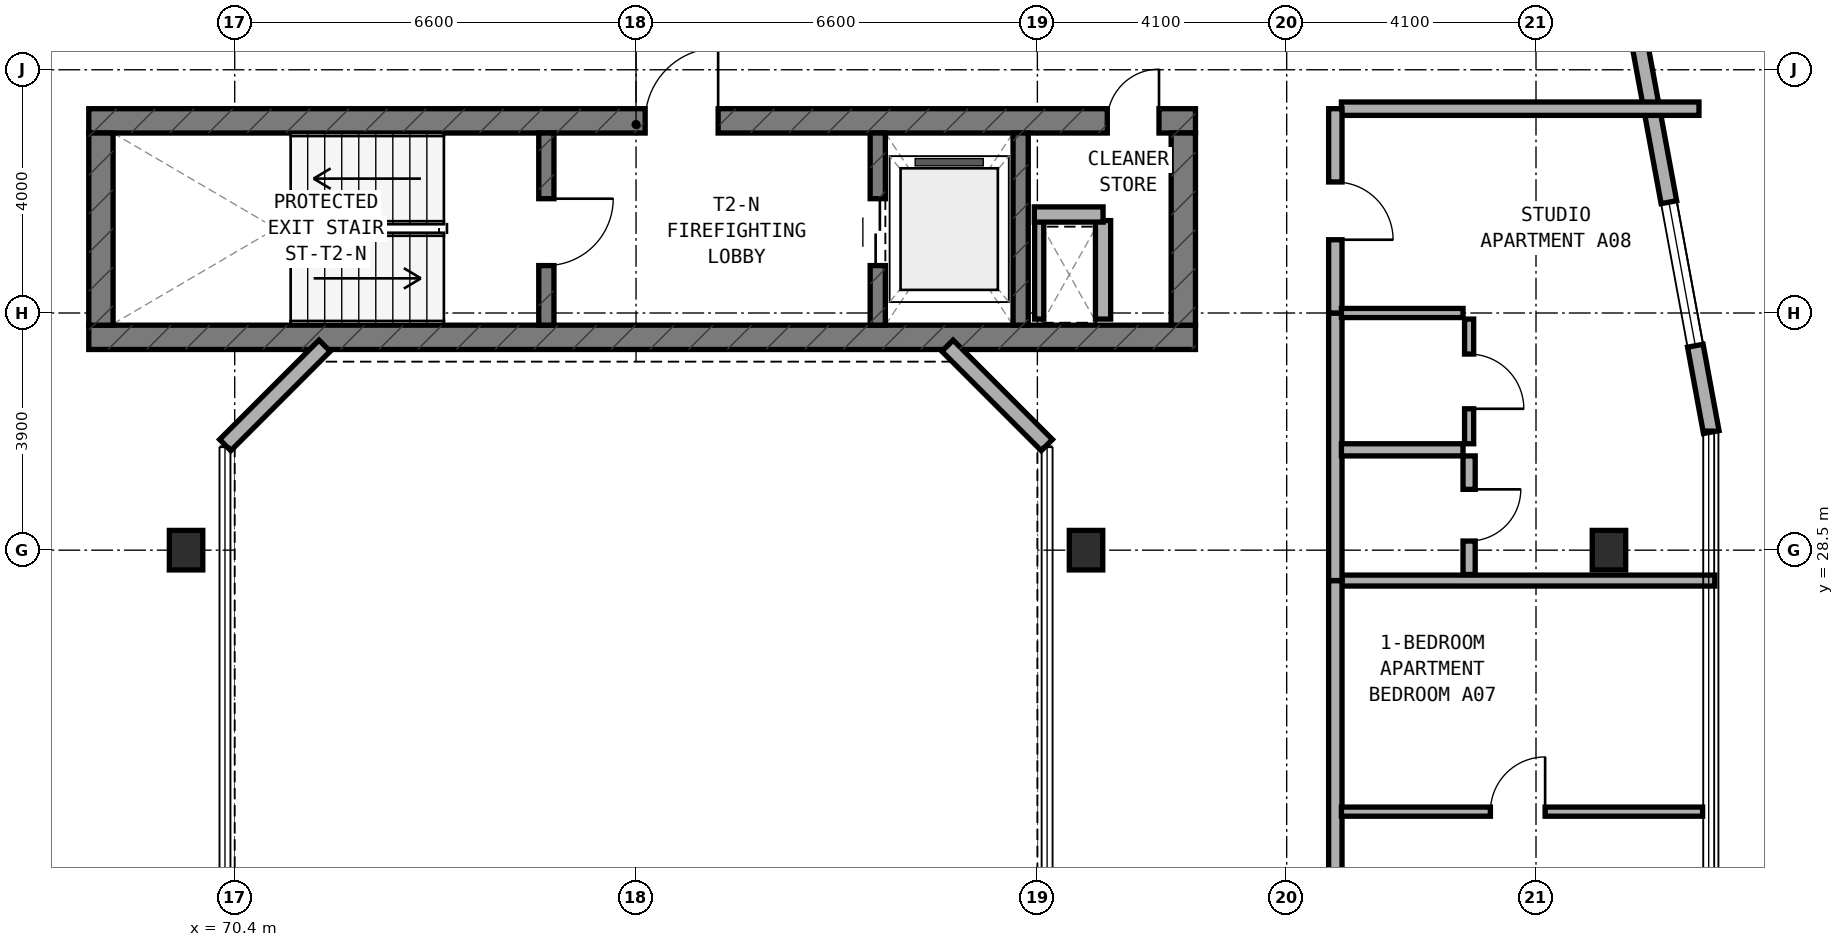
"""IFC4 building model, lengths in metres.
Left out: names, types, materials, properties, quantities, classifications, styles, units other than length and angle.
Written with IfcOpenShell. Run it as: python <this file> out.ifc"""

import sys

from ifc_helpers import new_model, si_unit, direction, frame, frame_2d, origin, origin_2d, place, context, subcontext, project, spatial, rectangle, extrude, element, fill, save


model = new_model("IFC4")
c1 = context("Model", 3, precision=1e-05, world=origin(), true_north=direction((0.0, 1.0)))
c2 = subcontext(c1, "Body", "Model", "MODEL_VIEW")
j1 = project(units=[si_unit("LENGTHUNIT", "METRE"), si_unit("PLANEANGLEUNIT", "RADIAN")], contexts=[c1])
p1 = place(None, origin())
s1 = spatial("IfcSite", under=j1, at=p1, CompositionType="ELEMENT")
p2 = place(p1, origin())
s2 = spatial("IfcBuilding", under=s1, at=p2, CompositionType="ELEMENT")
p3 = place(p2, frame((0.0, 0.0, 127.5)))
s3 = spatial("IfcBuildingStorey", under=s2, at=p3, CompositionType="ELEMENT", Elevation=127.5)
p4 = place(p3, frame((68.0, 32.0, 0.0), z_axis=(0.0, 0.0, 1.0), x_axis=(1.0, 0.0, 0.0)))
e1 = element("IfcWall", 1, at=p4, inside=s3, PredefinedType="SHEAR", context=c2, shape_type="SweptSolid", body=[
    extrude(rectangle(XDim=18.2, YDim=0.4, at=frame_2d((9.1, 0.0))), origin(), (0.0, 0.0, 1.0), 3.5),
])
p5 = place(p3, frame((68.0, 35.56, 0.0), z_axis=(0.0, 0.0, 1.0), x_axis=(1.0, 0.0, 0.0)))
e2 = element("IfcWall", 2, at=p5, inside=s3, PredefinedType="SHEAR", context=c2, shape_type="SweptSolid", body=[
    extrude(rectangle(XDim=18.2, YDim=0.4, at=frame_2d((9.1, 0.0))), origin(), (0.0, 0.0, 1.0), 3.5),
])
p6 = place(p5, frame((9.15, 0.0, 0.0)))
e3 = element("IfcOpeningElement", 3, at=p6, cuts=e2, PredefinedType="OPENING", context=c2, shape_type="SweptSolid", body=[
    extrude(rectangle(XDim=1.2, YDim=2.15, at=frame_2d((0.6, 1.075))), frame((0.0, 0.21, 0.0), z_axis=(0.0, -1.0, 0.0), x_axis=(1.0, 0.0, 0.0)), (0.0, 0.0, 1.0), 0.42),
])
p7 = place(p5, frame((16.75, 0.0, 0.0)))
e4 = element("IfcOpeningElement", 4, at=p7, cuts=e2, PredefinedType="OPENING", context=c2, shape_type="SweptSolid", body=[
    extrude(rectangle(XDim=0.85, YDim=2.1, at=frame_2d((0.425, 1.05))), frame((0.0, 0.21, 0.0), z_axis=(0.0, -1.0, 0.0), x_axis=(1.0, 0.0, 0.0)), (0.0, 0.0, 1.0), 0.42),
])
for number, where, z_axis, x_axis in (
    (5, (68.2, 32.2, 0.0), (0.0, 0.0, 1.0), (0.0, 1.0, 0.0)),
    (6, (86.0, 32.2, 0.0), (0.0, 0.0, 1.0), (0.0, 1.0, 0.0)),
):
    element("IfcWall", number, at=place(p3, frame(where, z_axis=z_axis, x_axis=x_axis)), inside=s3, PredefinedType="SHEAR", context=c2, shape_type="SweptSolid", body=[
        extrude(rectangle(XDim=3.16, YDim=0.4, at=frame_2d((1.58, 0.0))), origin(), (0.0, 0.0, 1.0), 3.5),
    ])
p8 = place(p3, frame((75.525, 32.2, 0.0), z_axis=(0.0, 0.0, 1.0), x_axis=(0.0, 1.0, 0.0)))
e7 = element("IfcWall", 7, at=p8, inside=s3, PredefinedType="STANDARD", context=c2, shape_type="SweptSolid", body=[
    extrude(rectangle(XDim=3.16, YDim=0.25, at=frame_2d((1.58, 0.0))), origin(), (0.0, 0.0, 1.0), 3.25),
])
p9 = place(p8, frame((0.98, 0.0, 0.0)))
e8 = element("IfcOpeningElement", 8, at=p9, cuts=e7, PredefinedType="OPENING", context=c2, shape_type="SweptSolid", body=[
    extrude(rectangle(XDim=1.1, YDim=2.15, at=frame_2d((0.55, 1.075))), frame((0.0, 0.135, 0.0), z_axis=(0.0, -1.0, 0.0), x_axis=(1.0, 0.0, 0.0)), (0.0, 0.0, 1.0), 0.27),
])
p10 = place(p3, frame((80.975, 32.2, 0.0), z_axis=(0.0, 0.0, 1.0), x_axis=(0.0, 1.0, 0.0)))
e9 = element("IfcWall", 9, at=p10, inside=s3, PredefinedType="STANDARD", context=c2, shape_type="SweptSolid", body=[
    extrude(rectangle(XDim=3.16, YDim=0.25, at=frame_2d((1.58, 0.0))), origin(), (0.0, 0.0, 1.0), 3.25),
])
p11 = place(p10, frame((0.98, 0.0, 0.0)))
e10 = element("IfcOpeningElement", 10, at=p11, cuts=e9, PredefinedType="OPENING", context=c2, shape_type="SweptSolid", body=[
    extrude(rectangle(XDim=1.1, YDim=2.15, at=frame_2d((0.55, 1.075))), frame((0.0, 0.135, 0.0), z_axis=(0.0, -1.0, 0.0), x_axis=(1.0, 0.0, 0.0)), (0.0, 0.0, 1.0), 0.27),
])
p12 = place(p3, frame((83.325, 32.2, 0.0), z_axis=(0.0, 0.0, 1.0), x_axis=(0.0, 1.0, 0.0)))
e11 = element("IfcWall", 11, at=p12, inside=s3, PredefinedType="STANDARD", context=c2, shape_type="SweptSolid", body=[
    extrude(rectangle(XDim=3.16, YDim=0.25, at=frame_2d((1.58, 0.0))), origin(), (0.0, 0.0, 1.0), 3.25),
])
p13 = place(p3, frame((93.0, 28.5, 0.0), z_axis=(0.0, 0.0, 1.0), x_axis=(1.0, 0.0, 0.0)))
e12 = element("IfcColumn", 12, at=p13, inside=s3, PredefinedType="COLUMN", context=c2, shape_type="SweptSolid", body=[
    extrude(rectangle(XDim=0.55, YDim=0.65, at=origin_2d()), origin(), (0.0, 0.0, 1.0), 3.24),
])
for number, where, z_axis, x_axis in (
    (13, (69.6, 28.5, 0.0), (0.0, 0.0, 1.0), (1.0, 0.0, 0.0)),
    (14, (84.4, 28.5, 0.0), (0.0, 0.0, 1.0), (1.0, 0.0, 0.0)),
):
    element("IfcColumn", number, at=place(p3, frame(where, z_axis=z_axis, x_axis=x_axis)), inside=s3, PredefinedType="COLUMN", context=c2, shape_type="SweptSolid", body=[
        extrude(rectangle(XDim=0.55, YDim=0.65, at=origin_2d()), origin(), (0.0, 0.0, 1.0), 3.5),
    ])
p14 = place(p3, frame((94.682, 30.442, 0.0), z_axis=(0.0, 0.0, 1.0), x_axis=(-0.181209963057, 0.983444431215, 0.0)))
e15 = element("IfcWall", 15, at=p14, inside=s3, PredefinedType="STANDARD", context=c2, shape_type="SweptSolid", body=[
    extrude(rectangle(XDim=8.889, YDim=0.26, at=frame_2d((4.445, 0.0))), origin(), (0.0, 0.0, 1.0), 3.25),
])
p15 = place(p14, frame((1.444, 0.0, 0.8)))
e16 = element("IfcOpeningElement", 16, at=p15, cuts=e15, PredefinedType="OPENING", context=c2, shape_type="SweptSolid", body=[
    extrude(rectangle(XDim=2.4, YDim=1.6, at=frame_2d((1.2, 0.8))), frame((0.0, 0.14, 0.0), z_axis=(0.0, -1.0, 0.0), x_axis=(1.0, 0.0, 0.0)), (0.0, 0.0, 1.0), 0.28),
])
for number, where, z_axis, x_axis in (
    (17, (83.756, 30.228, 0.0), (0.0, 0.0, 1.0), (-0.707, 0.707, 0.0)),
    (18, (71.878, 31.862, 0.0), (0.0, 0.0, 1.0), (-0.707, -0.707, 0.0)),
):
    element("IfcWall", number, at=place(p3, frame(where, z_axis=z_axis, x_axis=x_axis)), inside=s3, PredefinedType="STANDARD", context=c2, shape_type="SweptSolid", body=[
        extrude(rectangle(XDim=2.311, YDim=0.26, at=frame_2d((1.155, 0.0))), origin(), (0.0, 0.0, 1.0), 3.25),
    ])
p16 = place(p3, frame((83.63, 32.3, 0.0), z_axis=(0.0, 0.0, 1.0), x_axis=(0.0, 1.0, 0.0)))
e19 = element("IfcWall", 19, at=p16, inside=s3, PredefinedType="PARTITIONING", context=c2, shape_type="SweptSolid", body=[
    extrude(rectangle(XDim=1.62, YDim=0.15, at=frame_2d((0.81, 0.0))), origin(), (0.0, 0.0, 1.0), 3.22),
])
p17 = place(p3, frame((84.68, 32.3, 0.0), z_axis=(0.0, 0.0, 1.0), x_axis=(0.0, 1.0, 0.0)))
e20 = element("IfcWall", 20, at=p17, inside=s3, PredefinedType="SOLIDWALL", context=c2, shape_type="SweptSolid", body=[
    extrude(rectangle(XDim=1.62, YDim=0.25, at=frame_2d((0.81, 0.0))), origin(), (0.0, 0.0, 1.0), 3.22),
])
p18 = place(p3, frame((83.55, 34.02, 0.0), z_axis=(0.0, 0.0, 1.0), x_axis=(1.0, 0.0, 0.0)))
e21 = element("IfcWall", 21, at=p18, inside=s3, PredefinedType="SOLIDWALL", context=c2, shape_type="SweptSolid", body=[
    extrude(rectangle(XDim=1.13, YDim=0.25, at=frame_2d((0.565, 0.0))), origin(), (0.0, 0.0, 1.0), 3.22),
])
p19 = place(p3, frame((88.6, 35.76, 0.0), z_axis=(0.0, 0.0, 1.0), x_axis=(1.0, 0.0, 0.0)))
e22 = element("IfcWall", 22, at=p19, inside=s3, PredefinedType="SOLIDWALL", context=c2, shape_type="SweptSolid", body=[
    extrude(rectangle(XDim=5.88, YDim=0.22, at=frame_2d((2.94, 0.0))), origin(), (0.0, 0.0, 1.0), 2.815),
])
p20 = place(p3, frame((88.5, 28.0, 0.0), z_axis=(0.0, 0.0, 1.0), x_axis=(1.0, 0.0, 0.0)))
e23 = element("IfcWall", 23, at=p20, inside=s3, PredefinedType="SOLIDWALL", context=c2, shape_type="SweptSolid", body=[
    extrude(rectangle(XDim=6.24, YDim=0.18, at=frame_2d((3.12, 0.0))), origin(), (0.0, 0.0, 1.0), 2.815),
])
p21 = place(p3, frame((88.5, 18.64, 0.0), z_axis=(0.0, 0.0, 1.0), x_axis=(0.0, 1.0, 0.0)))
e24 = element("IfcWall", 24, at=p21, inside=s3, PredefinedType="SOLIDWALL", context=c2, shape_type="SweptSolid", body=[
    extrude(rectangle(XDim=9.36, YDim=0.22, at=frame_2d((4.68, 0.0))), origin(), (0.0, 0.0, 1.0), 2.815),
])
p22 = place(p21, frame((2.305, 0.0, 0.0)))
e25 = element("IfcOpeningElement", 25, at=p22, cuts=e24, PredefinedType="OPENING", context=c2, shape_type="SweptSolid", body=[
    extrude(rectangle(XDim=0.95, YDim=2.1, at=frame_2d((0.475, 1.05))), frame((0.0, 0.12, 0.0), z_axis=(0.0, -1.0, 0.0), x_axis=(1.0, 0.0, 0.0)), (0.0, 0.0, 1.0), 0.24),
])
p23 = place(p3, frame((88.6, 24.2, 0.0), z_axis=(0.0, 0.0, 1.0), x_axis=(1.0, 0.0, 0.0)))
e26 = element("IfcWall", 26, at=p23, inside=s3, PredefinedType="PARTITIONING", context=c2, shape_type="SweptSolid", body=[
    extrude(rectangle(XDim=5.94, YDim=0.15, at=frame_2d((2.97, 0.0))), origin(), (0.0, 0.0, 1.0), 2.815),
])
p24 = place(p23, frame((2.45, 0.0, 0.0)))
e27 = element("IfcOpeningElement", 27, at=p24, cuts=e26, PredefinedType="OPENING", context=c2, shape_type="SweptSolid", body=[
    extrude(rectangle(XDim=0.9, YDim=2.1, at=frame_2d((0.45, 1.05))), frame((0.0, 0.085, 0.0), z_axis=(0.0, -1.0, 0.0), x_axis=(1.0, 0.0, 0.0)), (0.0, 0.0, 1.0), 0.17),
])
p25 = place(p3, frame((88.5, 28.0, 0.0), z_axis=(0.0, 0.0, 1.0), x_axis=(0.0, 1.0, 0.0)))
e28 = element("IfcWall", 28, at=p25, inside=s3, PredefinedType="SOLIDWALL", context=c2, shape_type="SweptSolid", body=[
    extrude(rectangle(XDim=4.4, YDim=0.22, at=frame_2d((2.2, 0.0))), origin(), (0.0, 0.0, 1.0), 2.815),
])
p26 = place(p3, frame((88.5, 32.4, 0.0), z_axis=(0.0, 0.0, 1.0), x_axis=(0.0, 1.0, 0.0)))
e29 = element("IfcWall", 29, at=p26, inside=s3, PredefinedType="SOLIDWALL", context=c2, shape_type="SweptSolid", body=[
    extrude(rectangle(XDim=3.36, YDim=0.22, at=frame_2d((1.68, 0.0))), origin(), (0.0, 0.0, 1.0), 3.22),
])
p27 = place(p26, frame((1.205, 0.0, 0.0)))
e30 = element("IfcOpeningElement", 30, at=p27, cuts=e29, PredefinedType="OPENING", context=c2, shape_type="SweptSolid", body=[
    extrude(rectangle(XDim=0.95, YDim=2.1, at=frame_2d((0.475, 1.05))), frame((0.0, 0.12, 0.0), z_axis=(0.0, -1.0, 0.0), x_axis=(1.0, 0.0, 0.0)), (0.0, 0.0, 1.0), 0.24),
])
p28 = place(p3, frame((88.6, 30.15, 0.0), z_axis=(0.0, 0.0, 1.0), x_axis=(1.0, 0.0, 0.0)))
e31 = element("IfcWall", 31, at=p28, inside=s3, PredefinedType="PLUMBINGWALL", context=c2, shape_type="SweptSolid", body=[
    extrude(rectangle(XDim=2.0, YDim=0.2, at=frame_2d((1.0, 0.0))), origin(), (0.0, 0.0, 1.0), 3.22),
])
p29 = place(p3, frame((88.6, 32.4, 0.0), z_axis=(0.0, 0.0, 1.0), x_axis=(1.0, 0.0, 0.0)))
e32 = element("IfcWall", 32, at=p29, inside=s3, PredefinedType="PARTITIONING", context=c2, shape_type="SweptSolid", body=[
    extrude(rectangle(XDim=2.0, YDim=0.15, at=frame_2d((1.0, 0.0))), origin(), (0.0, 0.0, 1.0), 3.22),
])
p30 = place(p3, frame((90.7, 28.1, 0.0), z_axis=(0.0, 0.0, 1.0), x_axis=(0.0, 1.0, 0.0)))
e33 = element("IfcWall", 33, at=p30, inside=s3, PredefinedType="PLUMBINGWALL", context=c2, shape_type="SweptSolid", body=[
    extrude(rectangle(XDim=1.95, YDim=0.2, at=frame_2d((0.975, 0.0))), origin(), (0.0, 0.0, 1.0), 2.815),
])
p31 = place(p30, frame((0.55, 0.0, 0.0)))
e34 = element("IfcOpeningElement", 34, at=p31, cuts=e33, PredefinedType="OPENING", context=c2, shape_type="SweptSolid", body=[
    extrude(rectangle(XDim=0.85, YDim=2.1, at=frame_2d((0.425, 1.05))), frame((0.0, 0.11, 0.0), z_axis=(0.0, -1.0, 0.0), x_axis=(1.0, 0.0, 0.0)), (0.0, 0.0, 1.0), 0.22),
])
p32 = place(p3, frame((90.7, 30.25, 0.0), z_axis=(0.0, 0.0, 1.0), x_axis=(0.0, 1.0, 0.0)))
e35 = element("IfcWall", 35, at=p32, inside=s3, PredefinedType="PARTITIONING", context=c2, shape_type="SweptSolid", body=[
    extrude(rectangle(XDim=2.05, YDim=0.15, at=frame_2d((1.025, 0.0))), origin(), (0.0, 0.0, 1.0), 3.22),
])
p33 = place(p32, frame((0.575, 0.0, 0.0)))
e36 = element("IfcOpeningElement", 36, at=p33, cuts=e35, PredefinedType="OPENING", context=c2, shape_type="SweptSolid", body=[
    extrude(rectangle(XDim=0.9, YDim=2.1, at=frame_2d((0.45, 1.05))), frame((0.0, 0.085, 0.0), z_axis=(0.0, -1.0, 0.0), x_axis=(1.0, 0.0, 0.0)), (0.0, 0.0, 1.0), 0.17),
])
p34 = place(p15, origin())
e37 = element("IfcWindow", 37, at=p34, inside=s3, PartitioningType="SINGLE_PANEL", PredefinedType="WINDOW", context=c2, shape_type="SweptSolid", body=[
    extrude(rectangle(XDim=2.4, YDim=1.6, at=frame_2d((1.2, 0.8))), frame((0.0, 0.03, 0.0), z_axis=(0.0, -1.0, 0.0), x_axis=(1.0, 0.0, 0.0)), (0.0, 0.0, 1.0), 0.06),
])
fill(e16, e37)
p35 = place(p9, frame((1.1, 0.0, 0.0), z_axis=(0.0, 0.0, 1.0), x_axis=(-1.0, 0.0, 0.0)))
e38 = element("IfcDoor", 38, at=p35, inside=s3, OperationType="SINGLE_SWING_LEFT", PredefinedType="DOOR", context=c2, shape_type="SweptSolid", body=[
    extrude(rectangle(XDim=1.1, YDim=2.15, at=frame_2d((0.55, 1.075))), frame((0.0, 0.025, 0.0), z_axis=(0.0, -1.0, 0.0), x_axis=(1.0, 0.0, 0.0)), (0.0, 0.0, 1.0), 0.05),
])
fill(e8, e38)
p36 = place(p6, origin())
e39 = element("IfcDoor", 39, at=p36, inside=s3, OperationType="SINGLE_SWING_RIGHT", PredefinedType="DOOR", context=c2, shape_type="SweptSolid", body=[
    extrude(rectangle(XDim=1.2, YDim=2.15, at=frame_2d((0.6, 1.075))), frame((0.0, 0.025, 0.0), z_axis=(0.0, -1.0, 0.0), x_axis=(1.0, 0.0, 0.0)), (0.0, 0.0, 1.0), 0.05),
])
fill(e3, e39)
p37 = place(p11, origin())
e40 = element("IfcDoor", 40, at=p37, inside=s3, OperationType="DOUBLE_DOOR_SLIDING", PredefinedType="DOOR", context=c2, shape_type="SweptSolid", body=[
    extrude(rectangle(XDim=1.1, YDim=2.15, at=frame_2d((0.55, 1.075))), frame((0.0, 0.025, 0.0), z_axis=(0.0, -1.0, 0.0), x_axis=(1.0, 0.0, 0.0)), (0.0, 0.0, 1.0), 0.05),
])
fill(e10, e40)
p38 = place(p7, origin())
e41 = element("IfcDoor", 41, at=p38, inside=s3, OperationType="SINGLE_SWING_RIGHT", PredefinedType="DOOR", context=c2, shape_type="SweptSolid", body=[
    extrude(rectangle(XDim=0.85, YDim=2.1, at=frame_2d((0.425, 1.05))), frame((0.0, 0.025, 0.0), z_axis=(0.0, -1.0, 0.0), x_axis=(1.0, 0.0, 0.0)), (0.0, 0.0, 1.0), 0.05),
])
fill(e4, e41)
p39 = place(p24, origin())
e42 = element("IfcDoor", 42, at=p39, inside=s3, OperationType="SINGLE_SWING_RIGHT", PredefinedType="DOOR", context=c2, shape_type="SweptSolid", body=[
    extrude(rectangle(XDim=0.9, YDim=2.1, at=frame_2d((0.45, 1.05))), frame((0.0, 0.025, 0.0), z_axis=(0.0, -1.0, 0.0), x_axis=(1.0, 0.0, 0.0)), (0.0, 0.0, 1.0), 0.05),
])
fill(e27, e42)
p40 = place(p27, frame((0.95, 0.0, 0.0), z_axis=(0.0, 0.0, 1.0), x_axis=(-1.0, 0.0, 0.0)))
e43 = element("IfcDoor", 43, at=p40, inside=s3, OperationType="SINGLE_SWING_RIGHT", PredefinedType="DOOR", context=c2, shape_type="SweptSolid", body=[
    extrude(rectangle(XDim=0.95, YDim=2.1, at=frame_2d((0.475, 1.05))), frame((0.0, 0.025, 0.0), z_axis=(0.0, -1.0, 0.0), x_axis=(1.0, 0.0, 0.0)), (0.0, 0.0, 1.0), 0.05),
])
fill(e30, e43)
p41 = place(p31, frame((0.85, 0.0, 0.0), z_axis=(0.0, 0.0, 1.0), x_axis=(-1.0, 0.0, 0.0)))
e44 = element("IfcDoor", 44, at=p41, inside=s3, OperationType="SINGLE_SWING_LEFT", PredefinedType="DOOR", context=c2, shape_type="SweptSolid", body=[
    extrude(rectangle(XDim=0.85, YDim=2.1, at=frame_2d((0.425, 1.05))), frame((0.0, 0.025, 0.0), z_axis=(0.0, -1.0, 0.0), x_axis=(1.0, 0.0, 0.0)), (0.0, 0.0, 1.0), 0.05),
])
fill(e34, e44)
p42 = place(p33, frame((0.9, 0.0, 0.0), z_axis=(0.0, 0.0, 1.0), x_axis=(-1.0, 0.0, 0.0)))
e45 = element("IfcDoor", 45, at=p42, inside=s3, OperationType="SINGLE_SWING_RIGHT", PredefinedType="DOOR", context=c2, shape_type="SweptSolid", body=[
    extrude(rectangle(XDim=0.9, YDim=2.1, at=frame_2d((0.45, 1.05))), frame((0.0, 0.025, 0.0), z_axis=(0.0, -1.0, 0.0), x_axis=(1.0, 0.0, 0.0)), (0.0, 0.0, 1.0), 0.05),
])
fill(e36, e45)
save(model, sys.argv[1])
